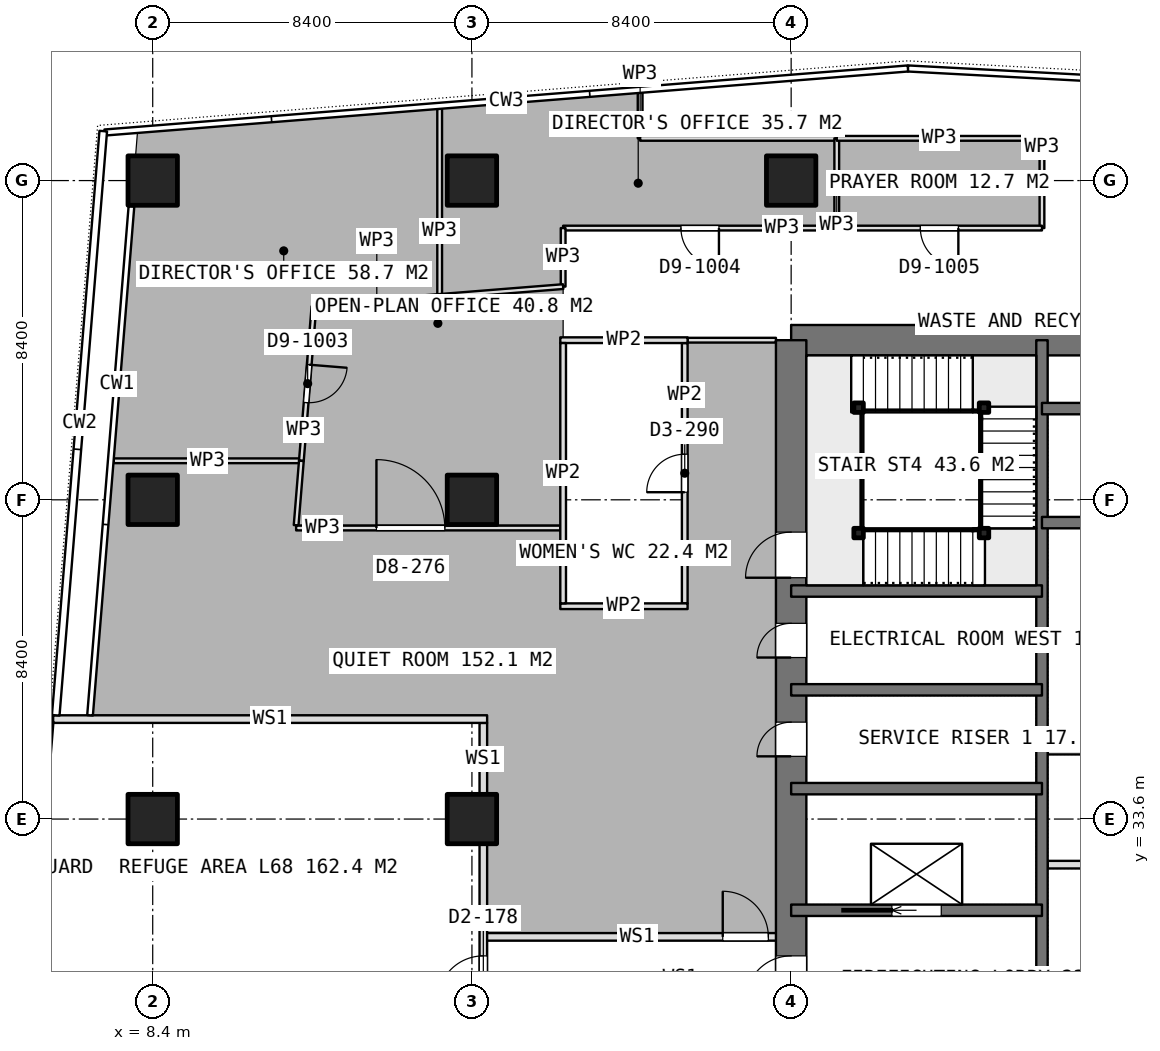
"""IFC4 building model, lengths in metres.
Left out: names, types, materials, properties, quantities, classifications, styles, units other than length and angle.
Written with IfcOpenShell. Run it as: python <this file> out.ifc"""

import sys

from ifc_helpers import new_model, si_unit, direction, frame, frame_2d, origin, origin_2d, place, context, subcontext, project, spatial, rectangle, extrude, element, fill, save


model = new_model("IFC4")
c1 = context("Model", 3, precision=1e-05, world=origin(), true_north=direction((0.0, 1.0)))
c2 = subcontext(c1, "Body", "Model", "MODEL_VIEW")
j1 = project(units=[si_unit("LENGTHUNIT", "METRE"), si_unit("PLANEANGLEUNIT", "RADIAN")], contexts=[c1])
p1 = place(None, origin())
s1 = spatial("IfcSite", under=j1, at=p1, CompositionType="ELEMENT")
p2 = place(p1, origin())
s2 = spatial("IfcBuilding", under=s1, at=p2, CompositionType="ELEMENT")
p3 = place(p2, frame((0.0, 0.0, 268.85)))
s3 = spatial("IfcBuildingStorey", under=s2, at=p3, CompositionType="ELEMENT", Elevation=268.85)
p4 = place(p3, frame((25.2, 46.2, 0.0), z_axis=(0.0, 0.0, 1.0), x_axis=(1.0, 0.0, 0.0)))
e1 = element("IfcWall", 1, at=p4, inside=s3, PredefinedType="SHEAR", context=c2, shape_type="SweptSolid", body=[
    extrude(rectangle(XDim=10.4, YDim=0.8, at=frame_2d((5.2, 0.0))), origin(), (0.0, 0.0, 1.0), 3.75),
])
p5 = place(p3, frame((25.2, 21.0, 0.0), z_axis=(0.0, 0.0, 1.0), x_axis=(0.0, 1.0, 0.0)))
e2 = element("IfcWall", 2, at=p5, inside=s3, PredefinedType="SHEAR", context=c2, shape_type="SweptSolid", body=[
    extrude(rectangle(XDim=25.2, YDim=0.8, at=frame_2d((12.6, 0.0))), origin(), (0.0, 0.0, 1.0), 3.75),
])
p6 = place(p5, frame((7.8, 0.0, 0.0)))
e3 = element("IfcOpeningElement", 3, at=p6, cuts=e2, PredefinedType="OPENING", context=c2, shape_type="SweptSolid", body=[
    extrude(rectangle(XDim=1.2, YDim=2.1, at=frame_2d((0.6, 1.05))), frame((0.0, 0.41, 0.0), z_axis=(0.0, -1.0, 0.0), x_axis=(1.0, 0.0, 0.0)), (0.0, 0.0, 1.0), 0.82),
])
p7 = place(p5, frame((14.25, 0.0, 0.0)))
e4 = element("IfcOpeningElement", 4, at=p7, cuts=e2, PredefinedType="OPENING", context=c2, shape_type="SweptSolid", body=[
    extrude(rectangle(XDim=0.9, YDim=2.1, at=frame_2d((0.45, 1.05))), frame((0.0, 0.41, 0.0), z_axis=(0.0, -1.0, 0.0), x_axis=(1.0, 0.0, 0.0)), (0.0, 0.0, 1.0), 0.82),
])
p8 = place(p5, frame((16.85, 0.0, 0.0)))
e5 = element("IfcOpeningElement", 5, at=p8, cuts=e2, PredefinedType="OPENING", context=c2, shape_type="SweptSolid", body=[
    extrude(rectangle(XDim=0.9, YDim=2.1, at=frame_2d((0.45, 1.05))), frame((0.0, 0.41, 0.0), z_axis=(0.0, -1.0, 0.0), x_axis=(1.0, 0.0, 0.0)), (0.0, 0.0, 1.0), 0.82),
])
p9 = place(p5, frame((18.95, 0.0, 0.0)))
e6 = element("IfcOpeningElement", 6, at=p9, cuts=e2, PredefinedType="OPENING", context=c2, shape_type="SweptSolid", body=[
    extrude(rectangle(XDim=1.2, YDim=2.1, at=frame_2d((0.6, 1.05))), frame((0.0, 0.41, 0.0), z_axis=(0.0, -1.0, 0.0), x_axis=(1.0, 0.0, 0.0)), (0.0, 0.0, 1.0), 0.82),
])
p10 = place(p3, frame((31.8, 21.0, 0.0), z_axis=(0.0, 0.0, 1.0), x_axis=(0.0, 1.0, 0.0)))
e7 = element("IfcWall", 7, at=p10, inside=s3, PredefinedType="SHEAR", context=c2, shape_type="SweptSolid", body=[
    extrude(rectangle(XDim=25.2, YDim=0.3, at=frame_2d((12.6, 0.0))), origin(), (0.0, 0.0, 1.0), 3.75),
])
for number, where, z_axis, x_axis in (
    (8, (31.8, 41.4, 0.0), (0.0, 0.0, 1.0), (1.0, 0.0, 0.0)),
    (9, (31.8, 44.4, 0.0), (0.0, 0.0, 1.0), (1.0, 0.0, 0.0)),
):
    element("IfcWall", number, at=place(p3, frame(where, z_axis=z_axis, x_axis=x_axis)), inside=s3, PredefinedType="SHEAR", context=c2, shape_type="SweptSolid", body=[
        extrude(rectangle(XDim=3.8, YDim=0.3, at=frame_2d((1.9, 0.0))), origin(), (0.0, 0.0, 1.0), 3.75),
    ])
p11 = place(p3, frame((25.2, 31.2, 0.0), z_axis=(0.0, 0.0, 1.0), x_axis=(1.0, 0.0, 0.0)))
e10 = element("IfcWall", 10, at=p11, inside=s3, PredefinedType="SHEAR", context=c2, shape_type="SweptSolid", body=[
    extrude(rectangle(XDim=6.6, YDim=0.3, at=frame_2d((3.3, 0.0))), origin(), (0.0, 0.0, 1.0), 3.75),
])
p12 = place(p11, frame((2.65, 0.0, 0.0)))
e11 = element("IfcOpeningElement", 11, at=p12, cuts=e10, PredefinedType="OPENING", context=c2, shape_type="SweptSolid", body=[
    extrude(rectangle(XDim=1.3, YDim=2.1, at=frame_2d((0.65, 1.05))), frame((0.0, 0.16, 0.0), z_axis=(0.0, -1.0, 0.0), x_axis=(1.0, 0.0, 0.0)), (0.0, 0.0, 1.0), 0.32),
])
for number, where, z_axis, x_axis in (
    (12, (25.2, 34.4, 0.0), (0.0, 0.0, 1.0), (1.0, 0.0, 0.0)),
    (13, (25.2, 37.0, 0.0), (0.0, 0.0, 1.0), (1.0, 0.0, 0.0)),
    (14, (25.2, 39.6, 0.0), (0.0, 0.0, 1.0), (1.0, 0.0, 0.0)),
):
    element("IfcWall", number, at=place(p3, frame(where, z_axis=z_axis, x_axis=x_axis)), inside=s3, PredefinedType="SHEAR", context=c2, shape_type="SweptSolid", body=[
        extrude(rectangle(XDim=6.6, YDim=0.3, at=frame_2d((3.3, 0.0))), origin(), (0.0, 0.0, 1.0), 3.75),
    ])
for number, where, z_axis, x_axis in (
    (15, (8.4, 33.6, 0.0), (0.0, 0.0, 1.0), (1.0, 0.0, 0.0)),
    (16, (8.4, 42.0, 0.0), (0.0, 0.0, 1.0), (1.0, 0.0, 0.0)),
    (17, (8.4, 50.4, 0.0), (0.0, 0.0, 1.0), (1.0, 0.0, 0.0)),
    (18, (16.8, 33.6, 0.0), (0.0, 0.0, 1.0), (1.0, 0.0, 0.0)),
    (19, (16.8, 42.0, 0.0), (0.0, 0.0, 1.0), (1.0, 0.0, 0.0)),
    (20, (16.8, 50.4, 0.0), (0.0, 0.0, 1.0), (1.0, 0.0, 0.0)),
    (21, (25.2, 50.4, 0.0), (0.0, 0.0, 1.0), (1.0, 0.0, 0.0)),
):
    element("IfcColumn", number, at=place(p3, frame(where, z_axis=z_axis, x_axis=x_axis)), inside=s3, PredefinedType="COLUMN", context=c2, shape_type="SweptSolid", body=[
        extrude(rectangle(XDim=1.3, YDim=1.3, at=origin_2d()), origin(), (0.0, 0.0, 1.0), 3.75),
    ])
for number, where, z_axis, x_axis in (
    (22, (31.95, 32.4, 0.0), (0.0, 0.0, 1.0), (1.0, 0.0, 0.0)),
    (23, (31.95, 35.4, 0.0), (0.0, 0.0, 1.0), (1.0, 0.0, 0.0)),
    (24, (31.95, 38.4, 0.0), (0.0, 0.0, 1.0), (1.0, 0.0, 0.0)),
):
    element("IfcWall", number, at=place(p3, frame(where, z_axis=z_axis, x_axis=x_axis)), inside=s3, PredefinedType="PARTITIONING", context=c2, shape_type="SweptSolid", body=[
        extrude(rectangle(XDim=3.5, YDim=0.2, at=frame_2d((1.75, 0.0))), origin(), (0.0, 0.0, 1.0), 3.5),
    ])
for number, where, z_axis, x_axis in (
    (25, (19.125, 39.2, 0.0), (0.0, 0.0, 1.0), (1.0, 0.0, 0.0)),
    (26, (19.125, 46.2, 0.0), (0.0, 0.0, 1.0), (1.0, 0.0, 0.0)),
):
    element("IfcWall", number, at=place(p3, frame(where, z_axis=z_axis, x_axis=x_axis)), inside=s3, PredefinedType="PARTITIONING", context=c2, shape_type="SweptSolid", body=[
        extrude(rectangle(XDim=3.35, YDim=0.15, at=frame_2d((1.675, 0.0))), origin(), (0.0, 0.0, 1.0), 3.5),
    ])
p13 = place(p3, frame((19.2, 39.275, 0.0), z_axis=(0.0, 0.0, 1.0), x_axis=(0.0, 1.0, 0.0)))
e27 = element("IfcWall", 27, at=p13, inside=s3, PredefinedType="PARTITIONING", context=c2, shape_type="SweptSolid", body=[
    extrude(rectangle(XDim=6.85, YDim=0.15, at=frame_2d((3.425, 0.0))), origin(), (0.0, 0.0, 1.0), 3.5),
])
p14 = place(p3, frame((22.4, 39.275, 0.0), z_axis=(0.0, 0.0, 1.0), x_axis=(0.0, 1.0, 0.0)))
e28 = element("IfcWall", 28, at=p14, inside=s3, PredefinedType="PARTITIONING", context=c2, shape_type="SweptSolid", body=[
    extrude(rectangle(XDim=6.85, YDim=0.15, at=frame_2d((3.425, 0.0))), origin(), (0.0, 0.0, 1.0), 3.5),
])
p15 = place(p14, frame((2.925, 0.0, 0.0)))
e29 = element("IfcOpeningElement", 29, at=p15, cuts=e28, PredefinedType="OPENING", context=c2, shape_type="SweptSolid", body=[
    extrude(rectangle(XDim=1.0, YDim=2.1, at=frame_2d((0.5, 1.05))), frame((0.0, 0.085, 0.0), z_axis=(0.0, -1.0, 0.0), x_axis=(1.0, 0.0, 0.0)), (0.0, 0.0, 1.0), 0.17),
])
p16 = place(p3, frame((15.951, 47.351, 0.0), z_axis=(0.0, 0.0, 1.0), x_axis=(0.0, 1.0, 0.0)))
e30 = element("IfcWall", 30, at=p16, inside=s3, PredefinedType="PARTITIONING", context=c2, shape_type="SweptSolid", body=[
    extrude(rectangle(XDim=4.936, YDim=0.125, at=frame_2d((2.468, 0.0))), origin(), (0.0, 0.0, 1.0), 3.5),
])
p17 = place(p3, frame((21.226, 52.708, 0.0), z_axis=(0.0, 0.0, 1.0), x_axis=(0.0, -1.0, 0.0)))
e31 = element("IfcWall", 31, at=p17, inside=s3, PredefinedType="PARTITIONING", context=c2, shape_type="SweptSolid", body=[
    extrude(rectangle(XDim=1.197, YDim=0.125, at=frame_2d((0.599, 0.0))), origin(), (0.0, 0.0, 1.0), 3.5),
])
p18 = place(p3, frame((21.226, 51.511, 0.0), z_axis=(0.0, 0.0, 1.0), x_axis=(1.0, 0.0, 0.0)))
e32 = element("IfcWall", 32, at=p18, inside=s3, PredefinedType="PARTITIONING", context=c2, shape_type="SweptSolid", body=[
    extrude(rectangle(XDim=5.174, YDim=0.125, at=frame_2d((2.587, 0.0))), origin(), (0.0, 0.0, 1.0), 3.5),
])
p19 = place(p3, frame((26.4, 51.511, 0.0), z_axis=(0.0, 0.0, 1.0), x_axis=(0.0, -1.0, 0.0)))
e33 = element("IfcWall", 33, at=p19, inside=s3, PredefinedType="PARTITIONING", context=c2, shape_type="SweptSolid", body=[
    extrude(rectangle(XDim=2.361, YDim=0.125, at=frame_2d((1.181, 0.0))), origin(), (0.0, 0.0, 1.0), 3.5),
])
p20 = place(p3, frame((26.4, 49.15, 0.0), z_axis=(0.0, 0.0, 1.0), x_axis=(-1.0, 0.0, 0.0)))
e34 = element("IfcWall", 34, at=p20, inside=s3, PredefinedType="PARTITIONING", context=c2, shape_type="SweptSolid", body=[
    extrude(rectangle(XDim=7.2, YDim=0.125, at=frame_2d((3.6, 0.0))), origin(), (0.0, 0.0, 1.0), 3.5),
])
p21 = place(p20, frame((3.1, 0.0, 0.0)))
e35 = element("IfcOpeningElement", 35, at=p21, cuts=e34, PredefinedType="OPENING", context=c2, shape_type="SweptSolid", body=[
    extrude(rectangle(XDim=1.0, YDim=2.1, at=frame_2d((0.5, 1.05))), frame((0.0, 0.073, 0.0), z_axis=(0.0, -1.0, 0.0), x_axis=(1.0, 0.0, 0.0)), (0.0, 0.0, 1.0), 0.145),
])
p22 = place(p3, frame((19.2, 49.15, 0.0), z_axis=(0.0, 0.0, 1.0), x_axis=(0.0, -1.0, 0.0)))
e36 = element("IfcWall", 36, at=p22, inside=s3, PredefinedType="PARTITIONING", context=c2, shape_type="SweptSolid", body=[
    extrude(rectangle(XDim=1.54, YDim=0.125, at=frame_2d((0.77, 0.0))), origin(), (0.0, 0.0, 1.0), 3.5),
])
p23 = place(p3, frame((19.2, 47.61, 0.0), z_axis=(0.0, 0.0, 1.0), x_axis=(-0.99683691537, -0.079474298708, 0.0)))
e37 = element("IfcWall", 37, at=p23, inside=s3, PredefinedType="PARTITIONING", context=c2, shape_type="SweptSolid", body=[
    extrude(rectangle(XDim=3.259, YDim=0.125, at=frame_2d((1.63, 0.0))), origin(), (0.0, 0.0, 1.0), 3.5),
])
p24 = place(p3, frame((12.312, 43.027, 0.0), z_axis=(0.0, 0.0, 1.0), x_axis=(-1.0, 0.0, 0.0)))
e38 = element("IfcWall", 38, at=p24, inside=s3, PredefinedType="PARTITIONING", context=c2, shape_type="SweptSolid", body=[
    extrude(rectangle(XDim=4.936, YDim=0.125, at=frame_2d((2.468, 0.0))), origin(), (0.0, 0.0, 1.0), 3.5),
])
p25 = place(p3, frame((15.95, 47.351, 0.0), z_axis=(0.0, 0.0, 1.0), x_axis=(-0.99682463174, -0.07962822086, 0.0)))
e39 = element("IfcWall", 39, at=p25, inside=s3, PredefinedType="PARTITIONING", context=c2, shape_type="SweptSolid", body=[
    extrude(rectangle(XDim=3.317, YDim=0.125, at=frame_2d((1.659, 0.0))), origin(), (0.0, 0.0, 1.0), 3.5),
])
p26 = place(p3, frame((12.643, 47.087, 0.0), z_axis=(0.0, 0.0, 1.0), x_axis=(-0.08127452151, -0.99669175383, 0.0)))
e40 = element("IfcWall", 40, at=p26, inside=s3, PredefinedType="PARTITIONING", context=c2, shape_type="SweptSolid", body=[
    extrude(rectangle(XDim=4.073, YDim=0.125, at=frame_2d((2.037, 0.0))), origin(), (0.0, 0.0, 1.0), 3.5),
])
p27 = place(p26, frame((1.537, 0.0, 0.0)))
e41 = element("IfcOpeningElement", 41, at=p27, cuts=e40, PredefinedType="OPENING", context=c2, shape_type="SweptSolid", body=[
    extrude(rectangle(XDim=1.0, YDim=2.1, at=frame_2d((0.5, 1.05))), frame((0.0, 0.073, 0.0), z_axis=(0.0, -1.0, 0.0), x_axis=(1.0, 0.0, 0.0)), (0.0, 0.0, 1.0), 0.145),
])
p28 = place(p3, frame((22.476, 46.2, 0.0), z_axis=(0.0, 0.0, 1.0), x_axis=(1.0, 0.0, 0.0)))
e42 = element("IfcWall", 42, at=p28, inside=s3, PredefinedType="PARTITIONING", context=c2, shape_type="SweptSolid", body=[
    extrude(rectangle(XDim=2.324, YDim=0.125, at=frame_2d((1.162, 0.0))), origin(), (0.0, 0.0, 1.0), 3.5),
])
p29 = place(p3, frame((12.312, 43.026, 0.0), z_axis=(0.0, 0.0, 1.0), x_axis=(-0.081120416901, -0.996704308189, 0.0)))
e43 = element("IfcWall", 43, at=p29, inside=s3, PredefinedType="PARTITIONING", context=c2, shape_type="SweptSolid", body=[
    extrude(rectangle(XDim=1.7, YDim=0.125, at=frame_2d((0.85, 0.0))), origin(), (0.0, 0.0, 1.0), 3.5),
])
p30 = place(p3, frame((12.174, 41.258, 0.0), z_axis=(0.0, 0.0, 1.0), x_axis=(1.0, 0.0, 0.0)))
e44 = element("IfcWall", 44, at=p30, inside=s3, PredefinedType="PARTITIONING", context=c2, shape_type="SweptSolid", body=[
    extrude(rectangle(XDim=6.951, YDim=0.125, at=frame_2d((3.476, 0.0))), origin(), (0.0, 0.0, 1.0), 3.5),
])
p31 = place(p30, frame((2.113, 0.0, 0.0)))
e45 = element("IfcOpeningElement", 45, at=p31, cuts=e44, PredefinedType="OPENING", context=c2, shape_type="SweptSolid", body=[
    extrude(rectangle(XDim=1.8, YDim=2.1, at=frame_2d((0.9, 1.05))), frame((0.0, 0.073, 0.0), z_axis=(0.0, -1.0, 0.0), x_axis=(1.0, 0.0, 0.0)), (0.0, 0.0, 1.0), 0.145),
])
p32 = place(p3, frame((26.4, 51.511, 0.0), z_axis=(0.0, 0.0, 1.0), x_axis=(1.0, 0.0, 0.0)))
e46 = element("IfcWall", 46, at=p32, inside=s3, PredefinedType="PARTITIONING", context=c2, shape_type="SweptSolid", body=[
    extrude(rectangle(XDim=5.4, YDim=0.125, at=frame_2d((2.7, 0.0))), origin(), (0.0, 0.0, 1.0), 3.5),
])
p33 = place(p3, frame((31.8, 51.511, 0.0), z_axis=(0.0, 0.0, 1.0), x_axis=(0.0, -1.0, 0.0)))
e47 = element("IfcWall", 47, at=p33, inside=s3, PredefinedType="PARTITIONING", context=c2, shape_type="SweptSolid", body=[
    extrude(rectangle(XDim=2.361, YDim=0.125, at=frame_2d((1.181, 0.0))), origin(), (0.0, 0.0, 1.0), 3.5),
])
p34 = place(p3, frame((31.8, 49.15, 0.0), z_axis=(0.0, 0.0, 1.0), x_axis=(-1.0, 0.0, 0.0)))
e48 = element("IfcWall", 48, at=p34, inside=s3, PredefinedType="PARTITIONING", context=c2, shape_type="SweptSolid", body=[
    extrude(rectangle(XDim=5.4, YDim=0.125, at=frame_2d((2.7, 0.0))), origin(), (0.0, 0.0, 1.0), 3.5),
])
p35 = place(p34, frame((2.2, 0.0, 0.0)))
e49 = element("IfcOpeningElement", 49, at=p35, cuts=e48, PredefinedType="OPENING", context=c2, shape_type="SweptSolid", body=[
    extrude(rectangle(XDim=1.0, YDim=2.1, at=frame_2d((0.5, 1.05))), frame((0.0, 0.073, 0.0), z_axis=(0.0, -1.0, 0.0), x_axis=(1.0, 0.0, 0.0)), (0.0, 0.0, 1.0), 0.145),
])
for number, where, z_axis, x_axis in (
    (50, (26.975, 41.125, 0.0), (0.0, 0.0, 1.0), (1.0, 0.0, 0.0)),
    (51, (30.275, 41.125, 0.0), (0.0, 0.0, 1.0), (1.0, 0.0, 0.0)),
    (52, (30.275, 44.425, 0.0), (0.0, 0.0, 1.0), (1.0, 0.0, 0.0)),
    (53, (26.975, 44.425, 0.0), (0.0, 0.0, 1.0), (1.0, 0.0, 0.0)),
):
    element("IfcColumn", number, at=place(p3, frame(where, z_axis=z_axis, x_axis=x_axis)), inside=s3, PredefinedType="COLUMN", context=c2, shape_type="SweptSolid", body=[
        extrude(rectangle(XDim=0.25, YDim=0.25, at=origin_2d()), origin(), (0.0, 0.0, 1.0), 3.75),
    ])
p36 = place(p3, frame((17.1, 25.85, 0.0), z_axis=(0.0, 0.0, 1.0), x_axis=(0.0, 1.0, 0.0)))
e54 = element("IfcWall", 54, at=p36, inside=s3, PredefinedType="PARTITIONING", context=c2, shape_type="SweptSolid", body=[
    extrude(rectangle(XDim=7.1, YDim=0.2, at=frame_2d((3.55, 0.0))), origin(), (0.0, 0.0, 1.0), 3.5),
])
p37 = place(p36, frame((2.95, 0.0, 0.0)))
e55 = element("IfcOpeningElement", 55, at=p37, cuts=e54, PredefinedType="OPENING", context=c2, shape_type="SweptSolid", body=[
    extrude(rectangle(XDim=1.2, YDim=2.1, at=frame_2d((0.6, 1.05))), frame((0.0, 0.11, 0.0), z_axis=(0.0, -1.0, 0.0), x_axis=(1.0, 0.0, 0.0)), (0.0, 0.0, 1.0), 0.22),
])
p38 = place(p3, frame((17.1, 34.25, 0.0), z_axis=(0.0, 0.0, 1.0), x_axis=(0.0, 1.0, 0.0)))
e56 = element("IfcWall", 56, at=p38, inside=s3, PredefinedType="PARTITIONING", context=c2, shape_type="SweptSolid", body=[
    extrude(rectangle(XDim=1.88, YDim=0.2, at=frame_2d((0.94, 0.0))), origin(), (0.0, 0.0, 1.0), 3.5),
])
p39 = place(p3, frame((5.78, 36.23, 0.0), z_axis=(0.0, 0.0, 1.0), x_axis=(1.0, 0.0, 0.0)))
e57 = element("IfcWall", 57, at=p39, inside=s3, PredefinedType="PARTITIONING", context=c2, shape_type="SweptSolid", body=[
    extrude(rectangle(XDim=11.42, YDim=0.2, at=frame_2d((5.71, 0.0))), origin(), (0.0, 0.0, 1.0), 3.5),
])
p40 = place(p3, frame((17.1, 30.5, 0.0), z_axis=(0.0, 0.0, 1.0), x_axis=(1.0, 0.0, 0.0)))
e58 = element("IfcWall", 58, at=p40, inside=s3, PredefinedType="PARTITIONING", context=c2, shape_type="SweptSolid", body=[
    extrude(rectangle(XDim=8.1, YDim=0.2, at=frame_2d((4.05, 0.0))), origin(), (0.0, 0.0, 1.0), 3.5),
])
p41 = place(p40, frame((6.3, 0.0, 0.0)))
e59 = element("IfcOpeningElement", 59, at=p41, cuts=e58, PredefinedType="OPENING", context=c2, shape_type="SweptSolid", body=[
    extrude(rectangle(XDim=1.2, YDim=2.1, at=frame_2d((0.6, 1.05))), frame((0.0, 0.11, 0.0), z_axis=(0.0, -1.0, 0.0), x_axis=(1.0, 0.0, 0.0)), (0.0, 0.0, 1.0), 0.22),
])
p42 = place(p6, origin())
e60 = element("IfcDoor", 60, at=p42, inside=s3, OperationType="SINGLE_SWING_LEFT", PredefinedType="DOOR", context=c2, shape_type="SweptSolid", body=[
    extrude(rectangle(XDim=1.2, YDim=2.1, at=frame_2d((0.6, 1.05))), frame((0.0, 0.025, 0.0), z_axis=(0.0, -1.0, 0.0), x_axis=(1.0, 0.0, 0.0)), (0.0, 0.0, 1.0), 0.05),
])
fill(e3, e60)
p43 = place(p7, origin())
e61 = element("IfcDoor", 61, at=p43, inside=s3, OperationType="SINGLE_SWING_LEFT", PredefinedType="DOOR", context=c2, shape_type="SweptSolid", body=[
    extrude(rectangle(XDim=0.9, YDim=2.1, at=frame_2d((0.45, 1.05))), frame((0.0, 0.025, 0.0), z_axis=(0.0, -1.0, 0.0), x_axis=(1.0, 0.0, 0.0)), (0.0, 0.0, 1.0), 0.05),
])
fill(e4, e61)
p44 = place(p8, origin())
e62 = element("IfcDoor", 62, at=p44, inside=s3, OperationType="SINGLE_SWING_LEFT", PredefinedType="DOOR", context=c2, shape_type="SweptSolid", body=[
    extrude(rectangle(XDim=0.9, YDim=2.1, at=frame_2d((0.45, 1.05))), frame((0.0, 0.025, 0.0), z_axis=(0.0, -1.0, 0.0), x_axis=(1.0, 0.0, 0.0)), (0.0, 0.0, 1.0), 0.05),
])
fill(e5, e62)
p45 = place(p12, origin())
e63 = element("IfcDoor", 63, at=p45, inside=s3, OperationType="SLIDING_TO_LEFT", PredefinedType="USERDEFINED", context=c2, shape_type="SweptSolid", body=[
    extrude(rectangle(XDim=1.3, YDim=2.1, at=frame_2d((0.65, 1.05))), frame((0.0, 0.025, 0.0), z_axis=(0.0, -1.0, 0.0), x_axis=(1.0, 0.0, 0.0)), (0.0, 0.0, 1.0), 0.05),
])
fill(e11, e63)
p46 = place(p15, origin())
e64 = element("IfcDoor", 64, at=p46, inside=s3, OperationType="SINGLE_SWING_LEFT", PredefinedType="DOOR", context=c2, shape_type="SweptSolid", body=[
    extrude(rectangle(XDim=1.0, YDim=2.1, at=frame_2d((0.5, 1.05))), frame((0.0, 0.025, 0.0), z_axis=(0.0, -1.0, 0.0), x_axis=(1.0, 0.0, 0.0)), (0.0, 0.0, 1.0), 0.05),
])
fill(e29, e64)
p47 = place(p21, origin())
e65 = element("IfcDoor", 65, at=p47, inside=s3, OperationType="SINGLE_SWING_LEFT", PredefinedType="DOOR", context=c2, shape_type="SweptSolid", body=[
    extrude(rectangle(XDim=1.0, YDim=2.1, at=frame_2d((0.5, 1.05))), frame((0.0, 0.025, 0.0), z_axis=(0.0, -1.0, 0.0), x_axis=(1.0, 0.0, 0.0)), (0.0, 0.0, 1.0), 0.05),
])
fill(e35, e65)
p48 = place(p27, origin())
e66 = element("IfcDoor", 66, at=p48, inside=s3, OperationType="SINGLE_SWING_LEFT", PredefinedType="DOOR", context=c2, shape_type="SweptSolid", body=[
    extrude(rectangle(XDim=1.0, YDim=2.1, at=frame_2d((0.5, 1.05))), frame((0.0, 0.025, 0.0), z_axis=(0.0, -1.0, 0.0), x_axis=(1.0, 0.0, 0.0)), (0.0, 0.0, 1.0), 0.05),
])
fill(e41, e66)
p49 = place(p31, origin())
e67 = element("IfcDoor", 67, at=p49, inside=s3, OperationType="DOUBLE_DOOR_SINGLE_SWING", PredefinedType="DOOR", context=c2, shape_type="SweptSolid", body=[
    extrude(rectangle(XDim=1.8, YDim=2.1, at=frame_2d((0.9, 1.05))), frame((0.0, 0.025, 0.0), z_axis=(0.0, -1.0, 0.0), x_axis=(1.0, 0.0, 0.0)), (0.0, 0.0, 1.0), 0.05),
])
fill(e45, e67)
p50 = place(p35, origin())
e68 = element("IfcDoor", 68, at=p50, inside=s3, OperationType="SINGLE_SWING_LEFT", PredefinedType="DOOR", context=c2, shape_type="SweptSolid", body=[
    extrude(rectangle(XDim=1.0, YDim=2.1, at=frame_2d((0.5, 1.05))), frame((0.0, 0.025, 0.0), z_axis=(0.0, -1.0, 0.0), x_axis=(1.0, 0.0, 0.0)), (0.0, 0.0, 1.0), 0.05),
])
fill(e49, e68)
p51 = place(p9, origin())
e69 = element("IfcDoor", 69, at=p51, inside=s3, OperationType="SINGLE_SWING_RIGHT", PredefinedType="DOOR", context=c2, shape_type="SweptSolid", body=[
    extrude(rectangle(XDim=1.2, YDim=2.1, at=frame_2d((0.6, 1.05))), frame((0.0, 0.025, 0.0), z_axis=(0.0, -1.0, 0.0), x_axis=(1.0, 0.0, 0.0)), (0.0, 0.0, 1.0), 0.05),
])
fill(e6, e69)
p52 = place(p37, origin())
e70 = element("IfcDoor", 70, at=p52, inside=s3, OperationType="SINGLE_SWING_LEFT", PredefinedType="DOOR", context=c2, shape_type="SweptSolid", body=[
    extrude(rectangle(XDim=1.2, YDim=2.1, at=frame_2d((0.6, 1.05))), frame((0.0, 0.025, 0.0), z_axis=(0.0, -1.0, 0.0), x_axis=(1.0, 0.0, 0.0)), (0.0, 0.0, 1.0), 0.05),
])
fill(e55, e70)
p53 = place(p41, origin())
e71 = element("IfcDoor", 71, at=p53, inside=s3, OperationType="SINGLE_SWING_LEFT", PredefinedType="DOOR", context=c2, shape_type="SweptSolid", body=[
    extrude(rectangle(XDim=1.2, YDim=2.1, at=frame_2d((0.6, 1.05))), frame((0.0, 0.025, 0.0), z_axis=(0.0, -1.0, 0.0), x_axis=(1.0, 0.0, 0.0)), (0.0, 0.0, 1.0), 0.05),
])
fill(e59, e71)
save(model, sys.argv[1])
